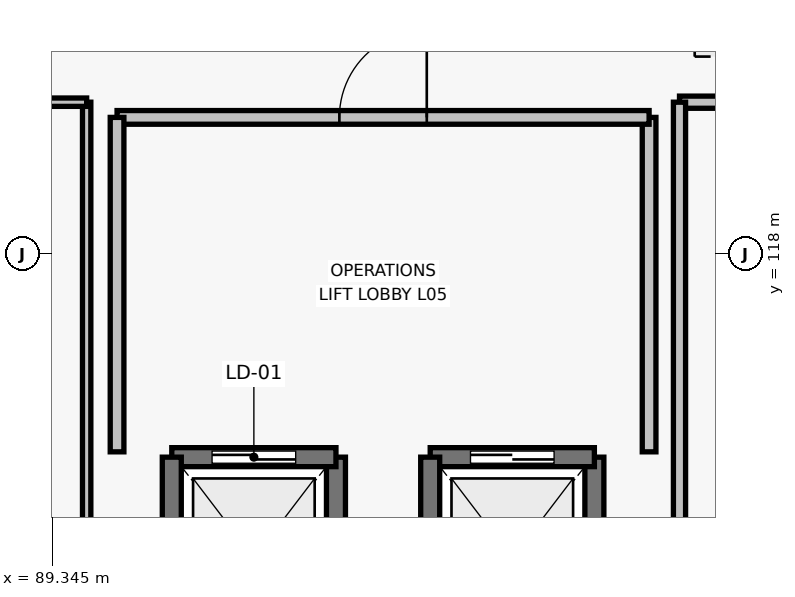
"""IFC4 building model, lengths in metres.
Left out: names, types, materials, properties, quantities, classifications, styles, units other than length and angle.
Written with IfcOpenShell. Run it as: python <this file> out.ifc"""

import sys

from ifc_helpers import new_model, si_unit, direction, frame, frame_2d, origin, origin_2d, place, context, subcontext, project, spatial, rectangle, extrude, element, fill, save


model = new_model("IFC4")
c1 = context("Model", 3, precision=1e-05, world=origin(), true_north=direction((0.0, 1.0)))
c2 = subcontext(c1, "Body", "Model", "MODEL_VIEW")
j1 = project(units=[si_unit("LENGTHUNIT", "METRE"), si_unit("PLANEANGLEUNIT", "RADIAN")], contexts=[c1])
p1 = place(None, origin())
s1 = spatial("IfcSite", under=j1, at=p1, CompositionType="ELEMENT")
p2 = place(p1, origin())
s2 = spatial("IfcBuilding", under=s1, at=p2, CompositionType="ELEMENT")
p3 = place(p2, frame((0.0, 0.0, 24.9)))
s3 = spatial("IfcBuildingStorey", under=s2, at=p3, CompositionType="ELEMENT", Elevation=24.9)
p4 = place(p3, frame((93.08, 112.67, 0.0), z_axis=(0.0, 0.0, 1.0), x_axis=(0.0, 1.0, 0.0)))
e1 = element("IfcWall", 1, at=p4, inside=s3, PredefinedType="SHEAR", context=c2, shape_type="SweptSolid", body=[
    extrude(rectangle(XDim=2.66, YDim=0.25, at=frame_2d((1.33, 0.0))), origin(), (0.0, 0.0, 1.0), 3.695),
])
p5 = place(p3, frame((93.08, 115.33, 0.0), z_axis=(0.0, 0.0, 1.0), x_axis=(-1.0, 0.0, 0.0)))
e2 = element("IfcWall", 2, at=p5, inside=s3, PredefinedType="SHEAR", context=c2, shape_type="SweptSolid", body=[
    extrude(rectangle(XDim=2.16, YDim=0.25, at=frame_2d((1.08, 0.0))), origin(), (0.0, 0.0, 1.0), 3.695),
])
p6 = place(p5, frame((0.53, 0.0, 0.0)))
e3 = element("IfcOpeningElement", 3, at=p6, cuts=e2, PredefinedType="OPENING", context=c2, shape_type="SweptSolid", body=[
    extrude(rectangle(XDim=1.1, YDim=2.2, at=frame_2d((0.55, 1.1))), frame((0.0, 0.135, 0.0), z_axis=(0.0, -1.0, 0.0), x_axis=(1.0, 0.0, 0.0)), (0.0, 0.0, 1.0), 0.27),
])
for number, where, z_axis, x_axis in (
    (4, (90.92, 115.33, 0.0), (0.0, 0.0, 1.0), (0.0, -1.0, 0.0)),
    (5, (96.48, 112.67, 0.0), (0.0, 0.0, 1.0), (0.0, 1.0, 0.0)),
):
    element("IfcWall", number, at=place(p3, frame(where, z_axis=z_axis, x_axis=x_axis)), inside=s3, PredefinedType="SHEAR", context=c2, shape_type="SweptSolid", body=[
        extrude(rectangle(XDim=2.66, YDim=0.25, at=frame_2d((1.33, 0.0))), origin(), (0.0, 0.0, 1.0), 3.695),
    ])
p7 = place(p3, frame((96.48, 115.33, 0.0), z_axis=(0.0, 0.0, 1.0), x_axis=(-1.0, 0.0, 0.0)))
e6 = element("IfcWall", 6, at=p7, inside=s3, PredefinedType="SHEAR", context=c2, shape_type="SweptSolid", body=[
    extrude(rectangle(XDim=2.16, YDim=0.25, at=frame_2d((1.08, 0.0))), origin(), (0.0, 0.0, 1.0), 3.695),
])
p8 = place(p7, frame((0.53, 0.0, 0.0)))
e7 = element("IfcOpeningElement", 7, at=p8, cuts=e6, PredefinedType="OPENING", context=c2, shape_type="SweptSolid", body=[
    extrude(rectangle(XDim=1.1, YDim=2.2, at=frame_2d((0.55, 1.1))), frame((0.0, 0.135, 0.0), z_axis=(0.0, -1.0, 0.0), x_axis=(1.0, 0.0, 0.0)), (0.0, 0.0, 1.0), 0.27),
])
p9 = place(p3, frame((94.32, 115.33, 0.0), z_axis=(0.0, 0.0, 1.0), x_axis=(0.0, -1.0, 0.0)))
e8 = element("IfcWall", 8, at=p9, inside=s3, PredefinedType="SHEAR", context=c2, shape_type="SweptSolid", body=[
    extrude(rectangle(XDim=2.66, YDim=0.25, at=frame_2d((1.33, 0.0))), origin(), (0.0, 0.0, 1.0), 3.695),
])
p10 = place(p3, frame((97.2, 115.4, 0.0), z_axis=(0.0, 0.0, 1.0), x_axis=(0.0, 1.0, 0.0)))
e9 = element("IfcWall", 9, at=p10, inside=s3, PredefinedType="PARTITIONING", context=c2, shape_type="SweptSolid", body=[
    extrude(rectangle(XDim=4.4, YDim=0.18, at=frame_2d((2.2, 0.0))), origin(), (0.0, 0.0, 1.0), 3.695),
])
p11 = place(p3, frame((97.2, 119.8, 0.0), z_axis=(0.0, 0.0, 1.0), x_axis=(-1.0, 0.0, 0.0)))
e10 = element("IfcWall", 10, at=p11, inside=s3, PredefinedType="PARTITIONING", context=c2, shape_type="SweptSolid", body=[
    extrude(rectangle(XDim=7.0, YDim=0.18, at=frame_2d((3.5, 0.0))), origin(), (0.0, 0.0, 1.0), 3.695),
])
p12 = place(p11, frame((4.075, 0.0, 0.0), z_axis=(0.0, 0.0, 1.0), x_axis=(-1.0, 0.0, 0.0)))
e11 = element("IfcOpeningElement", 11, at=p12, cuts=e10, PredefinedType="OPENING", context=c2, shape_type="SweptSolid", body=[
    extrude(rectangle(XDim=1.15, YDim=2.2, at=frame_2d((0.575, 1.1))), frame((0.0, 0.1, 0.0), z_axis=(0.0, -1.0, 0.0), x_axis=(1.0, 0.0, 0.0)), (0.0, 0.0, 1.0), 0.2),
])
p13 = place(p3, frame((90.2, 119.8, 0.0), z_axis=(0.0, 0.0, 1.0), x_axis=(0.0, -1.0, 0.0)))
e12 = element("IfcWall", 12, at=p13, inside=s3, PredefinedType="PARTITIONING", context=c2, shape_type="SweptSolid", body=[
    extrude(rectangle(XDim=4.4, YDim=0.18, at=frame_2d((2.2, 0.0))), origin(), (0.0, 0.0, 1.0), 3.695),
])
p14 = place(p3, frame((89.8, 110.2, 0.0), z_axis=(0.0, 0.0, 1.0), x_axis=(0.0, 1.0, 0.0)))
e13 = element("IfcWall", 13, at=p14, inside=s3, PredefinedType="MOVABLE", context=c2, shape_type="SweptSolid", body=[
    extrude(rectangle(XDim=9.8, YDim=0.11, at=frame_2d((4.9, 0.0))), origin(), (0.0, 0.0, 1.0), 3.695),
])
p15 = place(p3, frame((89.8, 120.0, 0.0), z_axis=(0.0, 0.0, 1.0), x_axis=(-1.0, 0.0, 0.0)))
e14 = element("IfcWall", 14, at=p15, inside=s3, PredefinedType="MOVABLE", context=c2, shape_type="SweptSolid", body=[
    extrude(rectangle(XDim=7.2, YDim=0.11, at=frame_2d((3.6, 0.0))), origin(), (0.0, 0.0, 1.0), 3.695),
])
p16 = place(p15, frame((3.325, 0.0, 0.0)))
e15 = element("IfcOpeningElement", 15, at=p16, cuts=e14, PredefinedType="OPENING", context=c2, shape_type="SweptSolid", body=[
    extrude(rectangle(XDim=0.95, YDim=2.15, at=frame_2d((0.475, 1.075))), frame((0.0, 0.065, 0.0), z_axis=(0.0, -1.0, 0.0), x_axis=(1.0, 0.0, 0.0)), (0.0, 0.0, 1.0), 0.13),
])
p17 = place(p3, frame((105.6, 120.0, 0.0), z_axis=(0.0, 0.0, 1.0), x_axis=(-1.0, 0.0, 0.0)))
e16 = element("IfcWall", 16, at=p17, inside=s3, PredefinedType="PARTITIONING", context=c2, shape_type="SweptSolid", body=[
    extrude(rectangle(XDim=8.0, YDim=0.16, at=frame_2d((4.0, 0.0))), origin(), (0.0, 0.0, 1.0), 3.695),
])
p18 = place(p17, frame((4.525, 0.0, 0.0), z_axis=(0.0, 0.0, 1.0), x_axis=(-1.0, 0.0, 0.0)))
e17 = element("IfcOpeningElement", 17, at=p18, cuts=e16, PredefinedType="OPENING", context=c2, shape_type="SweptSolid", body=[
    extrude(rectangle(XDim=1.45, YDim=2.25, at=frame_2d((0.725, 1.125))), frame((0.0, 0.09, 0.0), z_axis=(0.0, -1.0, 0.0), x_axis=(1.0, 0.0, 0.0)), (0.0, 0.0, 1.0), 0.18),
])
p19 = place(p3, frame((97.6, 120.0, 0.0), z_axis=(0.0, 0.0, 1.0), x_axis=(0.0, -1.0, 0.0)))
e18 = element("IfcWall", 18, at=p19, inside=s3, PredefinedType="PARTITIONING", context=c2, shape_type="SweptSolid", body=[
    extrude(rectangle(XDim=16.6, YDim=0.16, at=frame_2d((8.3, 0.0))), origin(), (0.0, 0.0, 1.0), 3.695),
])
p20 = place(p2, frame((0.0, 0.0, 28.8)))
p21 = place(p20, frame((0.0, 0.0, -0.205)))
p22 = place(p21, frame((99.0, 121.5, 0.0)))
p23 = place(p22, frame((0.0, 0.0, 0.155)))
e19 = element("IfcWindow", 19, at=p23, inside=s3, PartitioningType="SINGLE_PANEL", PredefinedType="SKYLIGHT", context=c2, shape_type="SweptSolid", body=[
    extrude(rectangle(XDim=2.4, YDim=1.8, at=origin_2d()), origin(), (0.0, 0.0, 1.0), 0.05),
])
p24 = place(p6, origin())
e20 = element("IfcDoor", 20, at=p24, inside=s3, OperationType="SLIDING_TO_LEFT", PredefinedType="DOOR", context=c2, shape_type="SweptSolid", body=[
    extrude(rectangle(XDim=1.1, YDim=2.2, at=frame_2d((0.55, 1.1))), frame((0.0, 0.025, 0.0), z_axis=(0.0, -1.0, 0.0), x_axis=(1.0, 0.0, 0.0)), (0.0, 0.0, 1.0), 0.05),
])
fill(e3, e20)
p25 = place(p8, origin())
e21 = element("IfcDoor", 21, at=p25, inside=s3, OperationType="SLIDING_TO_LEFT", PredefinedType="DOOR", context=c2, shape_type="SweptSolid", body=[
    extrude(rectangle(XDim=1.1, YDim=2.2, at=frame_2d((0.55, 1.1))), frame((0.0, 0.025, 0.0), z_axis=(0.0, -1.0, 0.0), x_axis=(1.0, 0.0, 0.0)), (0.0, 0.0, 1.0), 0.05),
])
fill(e7, e21)
p26 = place(p12, origin())
e22 = element("IfcDoor", 22, at=p26, inside=s3, OperationType="SINGLE_SWING_LEFT", PredefinedType="DOOR", context=c2, shape_type="SweptSolid", body=[
    extrude(rectangle(XDim=1.15, YDim=2.2, at=frame_2d((0.575, 1.1))), frame((0.0, 0.025, 0.0), z_axis=(0.0, -1.0, 0.0), x_axis=(1.0, 0.0, 0.0)), (0.0, 0.0, 1.0), 0.05),
])
fill(e11, e22)
save(model, sys.argv[1])
